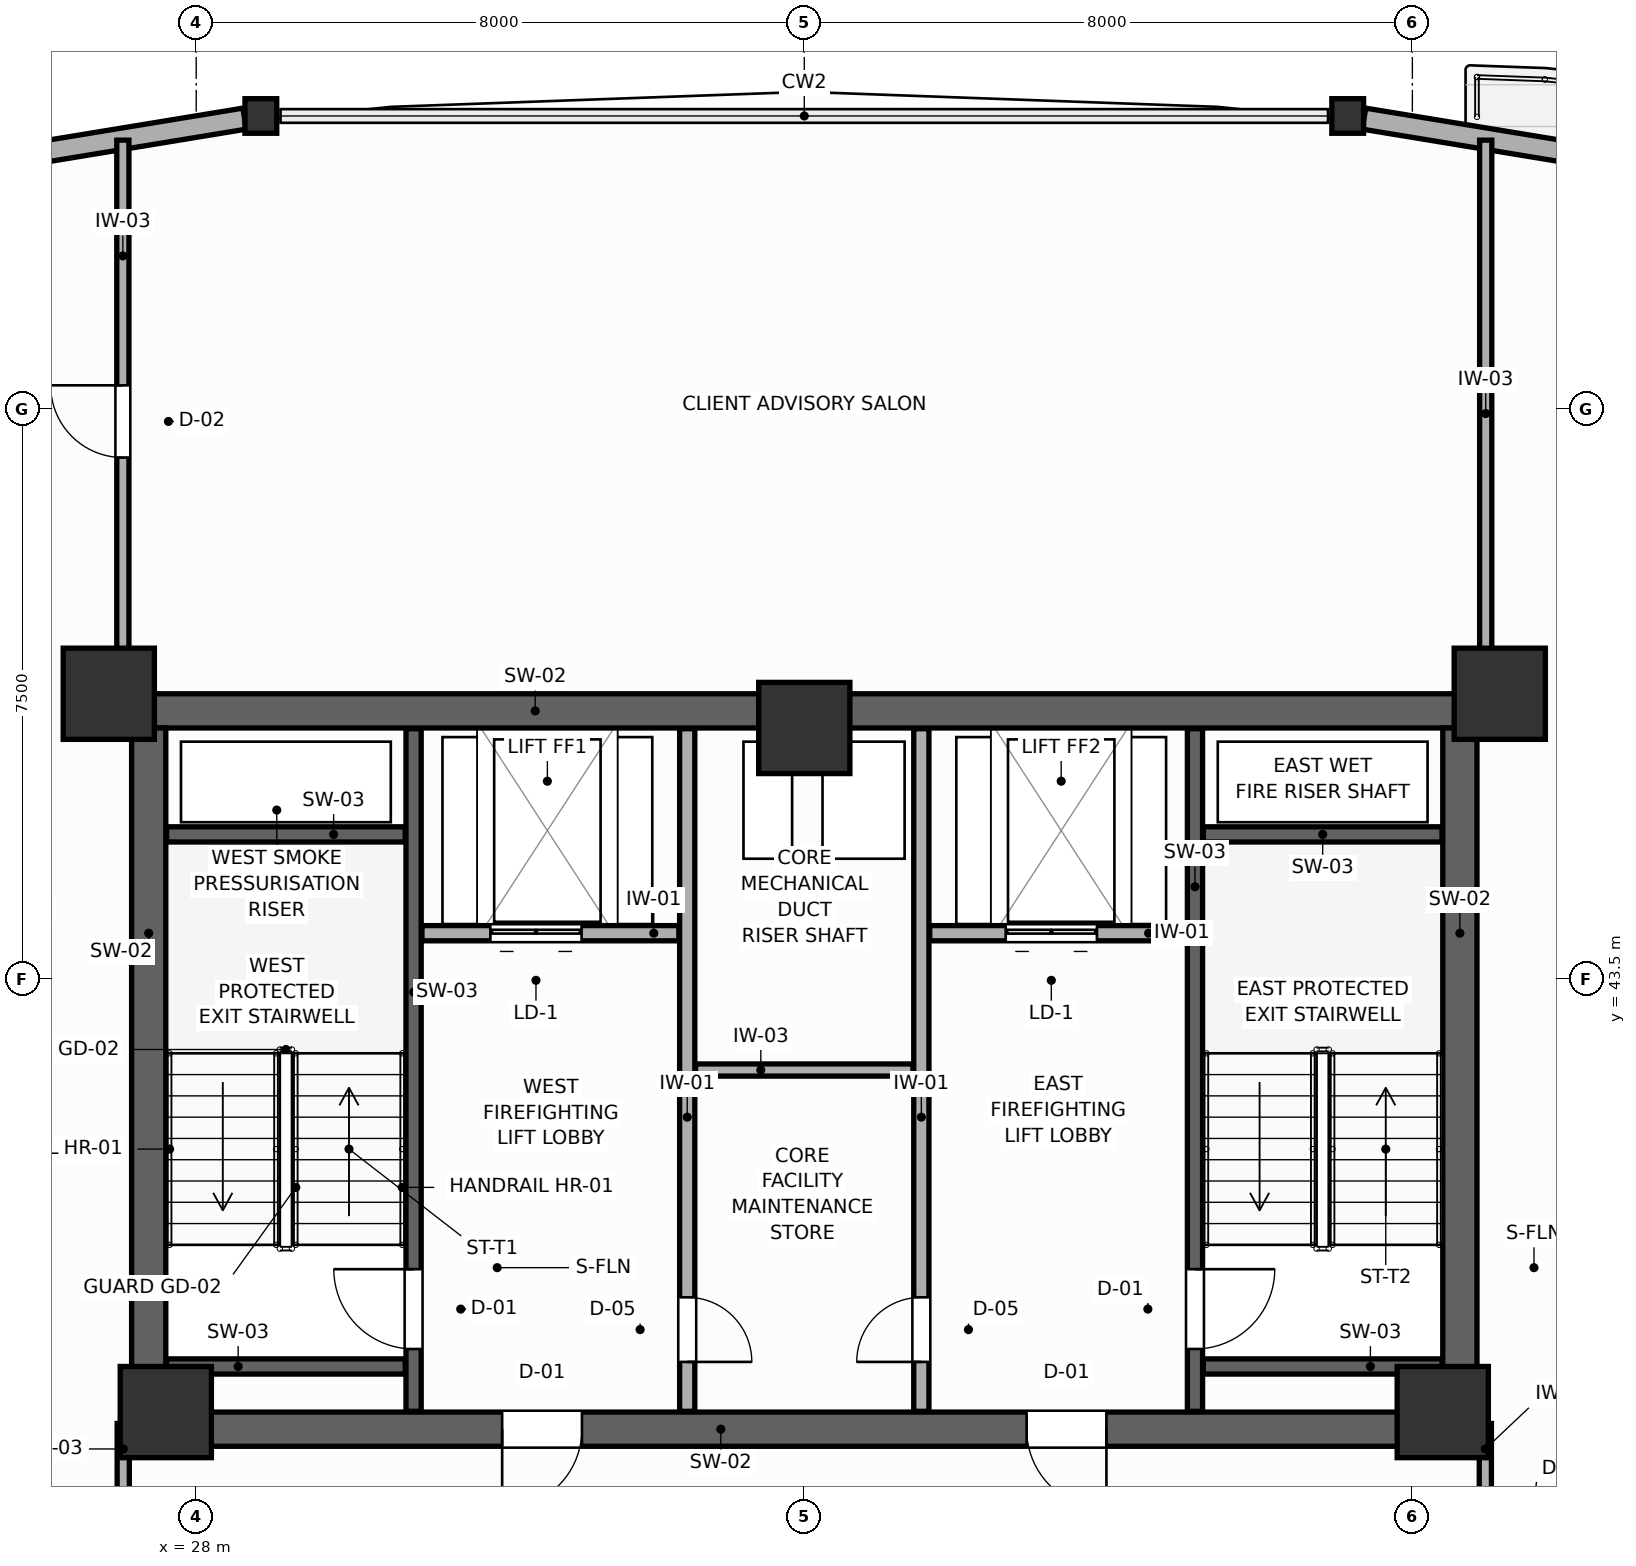
"""IFC4 building model, lengths in metres.
Left out: names, types, materials, properties, quantities, classifications, styles, units other than length and angle.
Written with IfcOpenShell. Run it as: python <this file> out.ifc"""

import sys

from ifc_helpers import new_model, si_unit, direction, frame, frame_2d, origin, origin_2d, place, context, subcontext, project, spatial, rectangle, i_section, extrude, source, transform, mapped, element, fill, save


model = new_model("IFC4")
c1 = context("Model", 3, precision=1e-05, world=origin(), true_north=direction((0.0, 1.0)))
c2 = subcontext(c1, "Body", "Model", "MODEL_VIEW")
j1 = project(units=[si_unit("LENGTHUNIT", "METRE"), si_unit("PLANEANGLEUNIT", "RADIAN")], contexts=[c1])
p1 = place(None, origin())
s1 = spatial("IfcSite", under=j1, at=p1, CompositionType="ELEMENT")
p2 = place(p1, origin())
s2 = spatial("IfcBuilding", under=s1, at=p2, CompositionType="ELEMENT")
p3 = place(p2, frame((0.0, 0.0, 99.0)))
s3 = spatial("IfcBuildingStorey", under=s2, at=p3, CompositionType="ELEMENT", Elevation=99.0)
p4 = place(p3, frame((27.15, 47.025, 0.0), z_axis=(0.0, 0.0, 1.0), x_axis=(1.0, 0.0, 0.0)))
e1 = element("IfcWall", 1, at=p4, inside=s3, PredefinedType="SHEAR", context=c2, shape_type="SweptSolid", body=[
    extrude(rectangle(XDim=17.7, YDim=0.45, at=frame_2d((8.85, 0.0))), origin(), (0.0, 0.0, 1.0), 3.6),
])
p5 = place(p3, frame((27.15, 37.575, 0.0), z_axis=(0.0, 0.0, 1.0), x_axis=(1.0, 0.0, 0.0)))
e2 = element("IfcWall", 2, at=p5, inside=s3, PredefinedType="SHEAR", context=c2, shape_type="SweptSolid", body=[
    extrude(rectangle(XDim=17.7, YDim=0.45, at=frame_2d((8.85, 0.0))), origin(), (0.0, 0.0, 1.0), 3.6),
])
p6 = place(p5, frame((4.875, 0.0, 0.0)))
e3 = element("IfcOpeningElement", 3, at=p6, cuts=e2, PredefinedType="OPENING", context=c2, shape_type="SweptSolid", body=[
    extrude(rectangle(XDim=1.05, YDim=2.1, at=frame_2d((0.525, 1.05))), frame((0.0, 0.235, 0.0), z_axis=(0.0, -1.0, 0.0), x_axis=(1.0, 0.0, 0.0)), (0.0, 0.0, 1.0), 0.47),
])
p7 = place(p5, frame((11.775, 0.0, 0.0)))
e4 = element("IfcOpeningElement", 4, at=p7, cuts=e2, PredefinedType="OPENING", context=c2, shape_type="SweptSolid", body=[
    extrude(rectangle(XDim=1.05, YDim=2.1, at=frame_2d((0.525, 1.05))), frame((0.0, 0.235, 0.0), z_axis=(0.0, -1.0, 0.0), x_axis=(1.0, 0.0, 0.0)), (0.0, 0.0, 1.0), 0.47),
])
for number, where, z_axis, x_axis in (
    (5, (27.375, 37.8, 0.0), (0.0, 0.0, 1.0), (0.0, 1.0, 0.0)),
    (6, (44.625, 37.8, 0.0), (0.0, 0.0, 1.0), (0.0, 1.0, 0.0)),
):
    element("IfcWall", number, at=place(p3, frame(where, z_axis=z_axis, x_axis=x_axis)), inside=s3, PredefinedType="SHEAR", context=c2, shape_type="SweptSolid", body=[
        extrude(rectangle(XDim=9.0, YDim=0.45, at=frame_2d((4.5, 0.0))), origin(), (0.0, 0.0, 1.0), 3.6),
    ])
m1 = source(origin(), c2, "Body", "SweptSolid", [
    extrude(rectangle(XDim=1.2, YDim=1.2, at=origin_2d()), origin(), (0.0, 0.0, 1.0), 3.6),
])
for number, where, z_axis, x_axis in (
    (7, (26.85, 47.25, 0.0), (0.0, 0.0, 1.0), (1.0, 0.0, 0.0)),
    (8, (45.15, 47.25, 0.0), (0.0, 0.0, 1.0), (1.0, 0.0, 0.0)),
    (9, (27.6, 37.8, 0.0), (0.0, 0.0, 1.0), (1.0, 0.0, 0.0)),
    (10, (44.4, 37.8, 0.0), (0.0, 0.0, 1.0), (1.0, 0.0, 0.0)),
    (11, (36.0, 46.8, 0.0), (0.0, 0.0, 1.0), (1.0, 0.0, 0.0)),
):
    element("IfcColumn", number, at=place(p3, frame(where, z_axis=z_axis, x_axis=x_axis)), inside=s3, PredefinedType="COLUMN", context=c2, shape_type="MappedRepresentation", body=[
        mapped(m1, transform((0.0, 0.0, 0.0), scale=1.0)),
    ])
m2 = source(origin(), c2, "Body", "SweptSolid", [
    extrude(i_section(OverallWidth=0.418, OverallDepth=0.455, WebThickness=0.039, FlangeThickness=0.063, FilletRadius=0.015, at=origin_2d()), origin(), (0.0, 0.0, 1.0), 3.6),
])
for number, where, z_axis, x_axis in (
    (12, (43.149, 54.852, 0.0), (0.0, 0.0, 1.0), (1.0, 0.0, 0.0)),
    (13, (28.851, 54.852, 0.0), (0.0, 0.0, 1.0), (1.0, 0.0, 0.0)),
):
    element("IfcColumn", number, at=place(p3, frame(where, z_axis=z_axis, x_axis=x_axis)), inside=s3, PredefinedType="COLUMN", context=c2, shape_type="MappedRepresentation", body=[
        mapped(m2, transform((0.0, 0.0, 0.0), scale=1.0)),
    ])
p8 = place(p3, frame((59.569, 52.155, 0.0), z_axis=(0.0, 0.0, 1.0), x_axis=(-0.986776921995, 0.162084256539, 0.0)))
e14 = element("IfcWall", 14, at=p8, inside=s3, PredefinedType="SOLIDWALL", context=c2, shape_type="SweptSolid", body=[
    extrude(rectangle(XDim=16.423, YDim=0.28, at=frame_2d((8.211, 0.0))), origin(), (0.0, 0.0, 1.0), 3.0),
])
p9 = place(p3, frame((28.637, 54.816, 0.0), z_axis=(0.0, 0.0, 1.0), x_axis=(-0.986776921995, -0.162084256539, 0.0)))
e15 = element("IfcWall", 15, at=p9, inside=s3, PredefinedType="SOLIDWALL", context=c2, shape_type="SweptSolid", body=[
    extrude(rectangle(XDim=16.423, YDim=0.28, at=frame_2d((8.211, 0.0))), origin(), (0.0, 0.0, 1.0), 2.95),
])
p10 = place(p3, frame((30.86, 37.81, 0.0), z_axis=(0.0, 0.0, 1.0), x_axis=(0.0, 1.0, 0.0)))
e16 = element("IfcWall", 16, at=p10, inside=s3, PredefinedType="SHEAR", context=c2, shape_type="SweptSolid", body=[
    extrude(rectangle(XDim=8.98, YDim=0.2, at=frame_2d((4.49, 0.0))), origin(), (0.0, 0.0, 1.0), 3.6),
])
p11 = place(p10, frame((0.82, 0.0, 0.0)))
e17 = element("IfcOpeningElement", 17, at=p11, cuts=e16, PredefinedType="OPENING", context=c2, shape_type="SweptSolid", body=[
    extrude(rectangle(XDim=1.05, YDim=2.1, at=frame_2d((0.525, 1.05))), frame((0.0, 0.11, 0.0), z_axis=(0.0, -1.0, 0.0), x_axis=(1.0, 0.0, 0.0)), (0.0, 0.0, 1.0), 0.22),
])
for number, where, z_axis, x_axis in (
    (18, (27.61, 45.4, 0.0), (0.0, 0.0, 1.0), (1.0, 0.0, 0.0)),
    (19, (27.61, 38.4, 0.0), (0.0, 0.0, 1.0), (1.0, 0.0, 0.0)),
):
    element("IfcWall", number, at=place(p3, frame(where, z_axis=z_axis, x_axis=x_axis)), inside=s3, PredefinedType="SHEAR", context=c2, shape_type="SweptSolid", body=[
        extrude(rectangle(XDim=3.14, YDim=0.2, at=frame_2d((1.57, 0.0))), origin(), (0.0, 0.0, 1.0), 3.6),
    ])
p12 = place(p3, frame((41.14, 37.81, 0.0), z_axis=(0.0, 0.0, 1.0), x_axis=(0.0, 1.0, 0.0)))
e20 = element("IfcWall", 20, at=p12, inside=s3, PredefinedType="SHEAR", context=c2, shape_type="SweptSolid", body=[
    extrude(rectangle(XDim=8.98, YDim=0.2, at=frame_2d((4.49, 0.0))), origin(), (0.0, 0.0, 1.0), 3.6),
])
p13 = place(p12, frame((0.82, 0.0, 0.0)))
e21 = element("IfcOpeningElement", 21, at=p13, cuts=e20, PredefinedType="OPENING", context=c2, shape_type="SweptSolid", body=[
    extrude(rectangle(XDim=1.05, YDim=2.1, at=frame_2d((0.525, 1.05))), frame((0.0, 0.11, 0.0), z_axis=(0.0, -1.0, 0.0), x_axis=(1.0, 0.0, 0.0)), (0.0, 0.0, 1.0), 0.22),
])
for number, where, z_axis, x_axis in (
    (22, (41.25, 45.4, 0.0), (0.0, 0.0, 1.0), (1.0, 0.0, 0.0)),
    (23, (41.25, 38.4, 0.0), (0.0, 0.0, 1.0), (1.0, 0.0, 0.0)),
):
    element("IfcWall", number, at=place(p3, frame(where, z_axis=z_axis, x_axis=x_axis)), inside=s3, PredefinedType="SHEAR", context=c2, shape_type="SweptSolid", body=[
        extrude(rectangle(XDim=3.14, YDim=0.2, at=frame_2d((1.57, 0.0))), origin(), (0.0, 0.0, 1.0), 3.6),
    ])
p14 = place(p3, frame((30.97, 44.1, 0.0), z_axis=(0.0, 0.0, 1.0), x_axis=(1.0, 0.0, 0.0)))
e24 = element("IfcWall", 24, at=p14, inside=s3, PredefinedType="PARTITIONING", context=c2, shape_type="SweptSolid", body=[
    extrude(rectangle(XDim=3.38, YDim=0.2, at=frame_2d((1.69, 0.0))), origin(), (0.0, 0.0, 1.0), 3.4),
])
p15 = place(p14, frame((0.9, 0.0, 0.0)))
e25 = element("IfcOpeningElement", 25, at=p15, cuts=e24, PredefinedType="OPENING", context=c2, shape_type="SweptSolid", body=[
    extrude(rectangle(XDim=1.2, YDim=2.1, at=frame_2d((0.6, 1.05))), frame((0.0, 0.11, 0.0), z_axis=(0.0, -1.0, 0.0), x_axis=(1.0, 0.0, 0.0)), (0.0, 0.0, 1.0), 0.22),
])
p16 = place(p3, frame((37.65, 44.1, 0.0), z_axis=(0.0, 0.0, 1.0), x_axis=(1.0, 0.0, 0.0)))
e26 = element("IfcWall", 26, at=p16, inside=s3, PredefinedType="PARTITIONING", context=c2, shape_type="SweptSolid", body=[
    extrude(rectangle(XDim=3.38, YDim=0.2, at=frame_2d((1.69, 0.0))), origin(), (0.0, 0.0, 1.0), 3.4),
])
p17 = place(p16, frame((1.0, 0.0, 0.0)))
e27 = element("IfcOpeningElement", 27, at=p17, cuts=e26, PredefinedType="OPENING", context=c2, shape_type="SweptSolid", body=[
    extrude(rectangle(XDim=1.2, YDim=2.1, at=frame_2d((0.6, 1.05))), frame((0.0, 0.11, 0.0), z_axis=(0.0, -1.0, 0.0), x_axis=(1.0, 0.0, 0.0)), (0.0, 0.0, 1.0), 0.22),
])
p18 = place(p3, frame((34.46, 37.81, 0.0), z_axis=(0.0, 0.0, 1.0), x_axis=(0.0, 1.0, 0.0)))
e28 = element("IfcWall", 28, at=p18, inside=s3, PredefinedType="PARTITIONING", context=c2, shape_type="SweptSolid", body=[
    extrude(rectangle(XDim=8.98, YDim=0.2, at=frame_2d((4.49, 0.0))), origin(), (0.0, 0.0, 1.0), 3.4),
])
p19 = place(p18, frame((0.65, 0.0, 0.0)))
e29 = element("IfcOpeningElement", 29, at=p19, cuts=e28, PredefinedType="OPENING", context=c2, shape_type="SweptSolid", body=[
    extrude(rectangle(XDim=0.85, YDim=2.05, at=frame_2d((0.425, 1.025))), frame((0.0, 0.11, 0.0), z_axis=(0.0, -1.0, 0.0), x_axis=(1.0, 0.0, 0.0)), (0.0, 0.0, 1.0), 0.22),
])
p20 = place(p3, frame((37.54, 37.81, 0.0), z_axis=(0.0, 0.0, 1.0), x_axis=(0.0, 1.0, 0.0)))
e30 = element("IfcWall", 30, at=p20, inside=s3, PredefinedType="PARTITIONING", context=c2, shape_type="SweptSolid", body=[
    extrude(rectangle(XDim=8.98, YDim=0.2, at=frame_2d((4.49, 0.0))), origin(), (0.0, 0.0, 1.0), 3.4),
])
p21 = place(p20, frame((0.65, 0.0, 0.0)))
e31 = element("IfcOpeningElement", 31, at=p21, cuts=e30, PredefinedType="OPENING", context=c2, shape_type="SweptSolid", body=[
    extrude(rectangle(XDim=0.85, YDim=2.05, at=frame_2d((0.425, 1.025))), frame((0.0, 0.11, 0.0), z_axis=(0.0, -1.0, 0.0), x_axis=(1.0, 0.0, 0.0)), (0.0, 0.0, 1.0), 0.22),
])
p22 = place(p3, frame((34.57, 42.3, 0.0), z_axis=(0.0, 0.0, 1.0), x_axis=(1.0, 0.0, 0.0)))
e32 = element("IfcWall", 32, at=p22, inside=s3, PredefinedType="PARTITIONING", context=c2, shape_type="SweptSolid", body=[
    extrude(rectangle(XDim=2.86, YDim=0.16, at=frame_2d((1.43, 0.0))), origin(), (0.0, 0.0, 1.0), 3.4),
])
p23 = place(p3, frame((27.04, 35.0, 0.0), z_axis=(0.0, 0.0, 1.0), x_axis=(0.0, 1.0, 0.0)))
e33 = element("IfcWall", 33, at=p23, inside=s3, PredefinedType="PARTITIONING", context=c2, shape_type="SweptSolid", body=[
    extrude(rectangle(XDim=2.65, YDim=0.16, at=frame_2d((1.325, 0.0))), origin(), (0.0, 0.0, 1.0), 3.4),
])
p24 = place(p23, frame((0.75, 0.0, 0.0)))
e34 = element("IfcOpeningElement", 34, at=p24, cuts=e33, PredefinedType="OPENING", context=c2, shape_type="SweptSolid", body=[
    extrude(rectangle(XDim=1.05, YDim=2.1, at=frame_2d((0.525, 1.05))), frame((0.0, 0.09, 0.0), z_axis=(0.0, -1.0, 0.0), x_axis=(1.0, 0.0, 0.0)), (0.0, 0.0, 1.0), 0.18),
])
p25 = place(p3, frame((44.96, 35.0, 0.0), z_axis=(0.0, 0.0, 1.0), x_axis=(0.0, 1.0, 0.0)))
e35 = element("IfcWall", 35, at=p25, inside=s3, PredefinedType="PARTITIONING", context=c2, shape_type="SweptSolid", body=[
    extrude(rectangle(XDim=2.65, YDim=0.16, at=frame_2d((1.325, 0.0))), origin(), (0.0, 0.0, 1.0), 3.4),
])
p26 = place(p25, frame((0.75, 0.0, 0.0)))
e36 = element("IfcOpeningElement", 36, at=p26, cuts=e35, PredefinedType="OPENING", context=c2, shape_type="SweptSolid", body=[
    extrude(rectangle(XDim=1.05, YDim=2.1, at=frame_2d((0.525, 1.05))), frame((0.0, 0.09, 0.0), z_axis=(0.0, -1.0, 0.0), x_axis=(1.0, 0.0, 0.0)), (0.0, 0.0, 1.0), 0.18),
])
p27 = place(p3, frame((27.035, 47.34, 0.0), z_axis=(0.0, 0.0, 1.0), x_axis=(0.0, 1.0, 0.0)))
e37 = element("IfcWall", 37, at=p27, inside=s3, PredefinedType="PARTITIONING", context=c2, shape_type="SweptSolid", body=[
    extrude(rectangle(XDim=7.193, YDim=0.16, at=frame_2d((3.597, 0.0))), origin(), (0.0, 0.0, 1.0), 2.95),
])
p28 = place(p27, frame((3.018, 0.0, 0.0)))
e38 = element("IfcOpeningElement", 38, at=p28, cuts=e37, PredefinedType="OPENING", context=c2, shape_type="SweptSolid", body=[
    extrude(rectangle(XDim=0.95, YDim=2.05, at=frame_2d((0.475, 1.025))), frame((0.0, 0.09, 0.0), z_axis=(0.0, -1.0, 0.0), x_axis=(1.0, 0.0, 0.0)), (0.0, 0.0, 1.0), 0.18),
])
p29 = place(p3, frame((44.965, 47.34, 0.0), z_axis=(0.0, 0.0, 1.0), x_axis=(0.0, 1.0, 0.0)))
e39 = element("IfcWall", 39, at=p29, inside=s3, PredefinedType="PARTITIONING", context=c2, shape_type="SweptSolid", body=[
    extrude(rectangle(XDim=7.193, YDim=0.16, at=frame_2d((3.597, 0.0))), origin(), (0.0, 0.0, 1.0), 2.95),
])
p30 = place(p11, origin())
e40 = element("IfcDoor", 40, at=p30, inside=s3, OperationType="SINGLE_SWING_RIGHT", PredefinedType="DOOR", context=c2, shape_type="SweptSolid", body=[
    extrude(rectangle(XDim=1.05, YDim=2.1, at=frame_2d((0.525, 1.05))), frame((0.0, 0.025, 0.0), z_axis=(0.0, -1.0, 0.0), x_axis=(1.0, 0.0, 0.0)), (0.0, 0.0, 1.0), 0.05),
])
fill(e17, e40)
p31 = place(p13, frame((1.05, 0.0, 0.0), z_axis=(0.0, 0.0, 1.0), x_axis=(-1.0, 0.0, 0.0)))
e41 = element("IfcDoor", 41, at=p31, inside=s3, OperationType="SINGLE_SWING_LEFT", PredefinedType="DOOR", context=c2, shape_type="SweptSolid", body=[
    extrude(rectangle(XDim=1.05, YDim=2.1, at=frame_2d((0.525, 1.05))), frame((0.0, 0.025, 0.0), z_axis=(0.0, -1.0, 0.0), x_axis=(1.0, 0.0, 0.0)), (0.0, 0.0, 1.0), 0.05),
])
fill(e21, e41)
p32 = place(p15, origin())
e42 = element("IfcDoor", 42, at=p32, inside=s3, OperationType="DOUBLE_DOOR_SLIDING", PredefinedType="DOOR", context=c2, shape_type="SweptSolid", body=[
    extrude(rectangle(XDim=1.2, YDim=2.1, at=frame_2d((0.6, 1.05))), frame((0.0, 0.025, 0.0), z_axis=(0.0, -1.0, 0.0), x_axis=(1.0, 0.0, 0.0)), (0.0, 0.0, 1.0), 0.05),
])
fill(e25, e42)
p33 = place(p17, origin())
e43 = element("IfcDoor", 43, at=p33, inside=s3, OperationType="DOUBLE_DOOR_SLIDING", PredefinedType="DOOR", context=c2, shape_type="SweptSolid", body=[
    extrude(rectangle(XDim=1.2, YDim=2.1, at=frame_2d((0.6, 1.05))), frame((0.0, 0.025, 0.0), z_axis=(0.0, -1.0, 0.0), x_axis=(1.0, 0.0, 0.0)), (0.0, 0.0, 1.0), 0.05),
])
fill(e27, e43)
p34 = place(p19, frame((0.85, 0.0, 0.0), z_axis=(0.0, 0.0, 1.0), x_axis=(-1.0, 0.0, 0.0)))
e44 = element("IfcDoor", 44, at=p34, inside=s3, OperationType="SINGLE_SWING_RIGHT", PredefinedType="DOOR", context=c2, shape_type="SweptSolid", body=[
    extrude(rectangle(XDim=0.85, YDim=2.05, at=frame_2d((0.425, 1.025))), frame((0.0, 0.025, 0.0), z_axis=(0.0, -1.0, 0.0), x_axis=(1.0, 0.0, 0.0)), (0.0, 0.0, 1.0), 0.05),
])
fill(e29, e44)
p35 = place(p21, origin())
e45 = element("IfcDoor", 45, at=p35, inside=s3, OperationType="SINGLE_SWING_LEFT", PredefinedType="DOOR", context=c2, shape_type="SweptSolid", body=[
    extrude(rectangle(XDim=0.85, YDim=2.05, at=frame_2d((0.425, 1.025))), frame((0.0, 0.025, 0.0), z_axis=(0.0, -1.0, 0.0), x_axis=(1.0, 0.0, 0.0)), (0.0, 0.0, 1.0), 0.05),
])
fill(e31, e45)
p36 = place(p28, origin())
e46 = element("IfcDoor", 46, at=p36, inside=s3, OperationType="SINGLE_SWING_RIGHT", PredefinedType="DOOR", context=c2, shape_type="SweptSolid", body=[
    extrude(rectangle(XDim=0.95, YDim=2.05, at=frame_2d((0.475, 1.025))), frame((0.0, 0.025, 0.0), z_axis=(0.0, -1.0, 0.0), x_axis=(1.0, 0.0, 0.0)), (0.0, 0.0, 1.0), 0.05),
])
fill(e38, e46)
p37 = place(p6, frame((1.05, 0.0, 0.0), z_axis=(0.0, 0.0, 1.0), x_axis=(-1.0, 0.0, 0.0)))
e47 = element("IfcDoor", 47, at=p37, inside=s3, OperationType="SINGLE_SWING_RIGHT", PredefinedType="DOOR", context=c2, shape_type="SweptSolid", body=[
    extrude(rectangle(XDim=1.05, YDim=2.1, at=frame_2d((0.525, 1.05))), frame((0.0, 0.025, 0.0), z_axis=(0.0, -1.0, 0.0), x_axis=(1.0, 0.0, 0.0)), (0.0, 0.0, 1.0), 0.05),
])
fill(e3, e47)
p38 = place(p7, frame((1.05, 0.0, 0.0), z_axis=(0.0, 0.0, 1.0), x_axis=(-1.0, 0.0, 0.0)))
e48 = element("IfcDoor", 48, at=p38, inside=s3, OperationType="SINGLE_SWING_LEFT", PredefinedType="DOOR", context=c2, shape_type="SweptSolid", body=[
    extrude(rectangle(XDim=1.05, YDim=2.1, at=frame_2d((0.525, 1.05))), frame((0.0, 0.025, 0.0), z_axis=(0.0, -1.0, 0.0), x_axis=(1.0, 0.0, 0.0)), (0.0, 0.0, 1.0), 0.05),
])
fill(e4, e48)
save(model, sys.argv[1])
